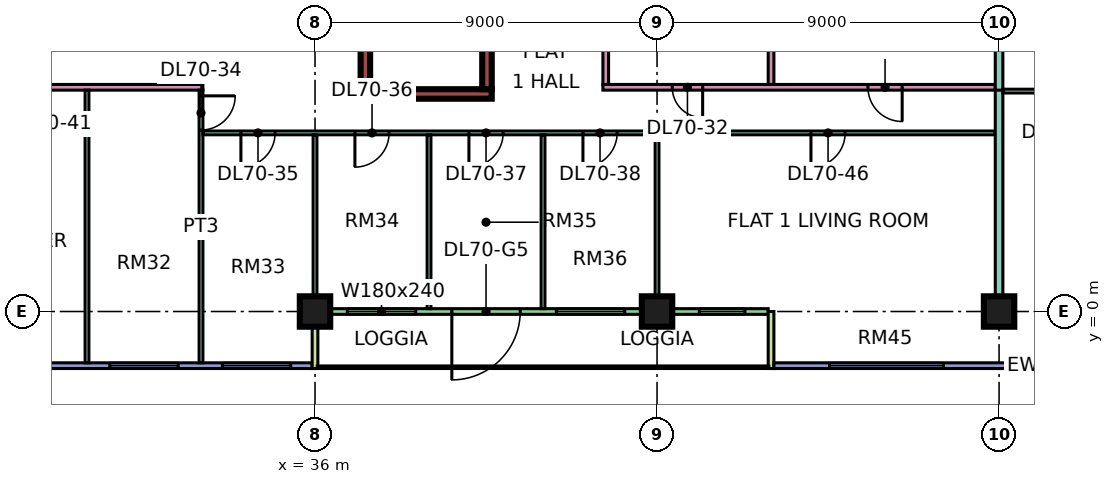
"""IFC4 building model, lengths in metres.
Left out: names, types, materials, properties, quantities, classifications, styles, units other than length and angle.
Written with IfcOpenShell. Run it as: python <this file> out.ifc"""

import sys

from ifc_helpers import new_model, si_unit, direction, frame, frame_2d, origin, origin_2d, place, context, subcontext, project, spatial, rectangle, extrude, element, fill, save


model = new_model("IFC4")
c1 = context("Model", 3, precision=1e-05, world=origin(), true_north=direction((0.0, 1.0)))
c2 = subcontext(c1, "Body", "Model", "MODEL_VIEW")
j1 = project(units=[si_unit("LENGTHUNIT", "METRE"), si_unit("PLANEANGLEUNIT", "RADIAN")], contexts=[c1])
p1 = place(None, origin())
s1 = spatial("IfcSite", under=j1, at=p1, CompositionType="ELEMENT")
p2 = place(p1, origin())
s2 = spatial("IfcBuilding", under=s1, at=p2, CompositionType="ELEMENT")
p3 = place(p2, frame((0.0, 0.0, 299.65)))
s3 = spatial("IfcBuildingStorey", under=s2, at=p3, CompositionType="ELEMENT", Elevation=299.65)
for number, where, z_axis, x_axis in (
    (1, (36.0, 0.0, 0.0), (0.0, 0.0, 1.0), (1.0, 0.0, 0.0)),
    (2, (45.0, 0.0, 0.0), (0.0, 0.0, 1.0), (1.0, 0.0, 0.0)),
    (3, (54.0, 0.0, 0.0), (0.0, 0.0, 1.0), (1.0, 0.0, 0.0)),
):
    element("IfcColumn", number, at=place(p3, frame(where, z_axis=z_axis, x_axis=x_axis)), inside=s3, PredefinedType="COLUMN", context=c2, shape_type="SweptSolid", body=[
        extrude(rectangle(XDim=0.8, YDim=0.8, at=origin_2d()), origin(), (0.0, 0.0, 1.0), 3.75),
    ])
p4 = place(p3, frame((37.2, 5.725, 0.0), z_axis=(0.0, 0.0, 1.0), x_axis=(1.0, 0.0, 0.0)))
e4 = element("IfcWall", 4, at=p4, inside=s3, PredefinedType="SHEAR", context=c2, shape_type="SweptSolid", body=[
    extrude(rectangle(XDim=3.45, YDim=0.25, at=frame_2d((1.725, 0.0))), origin(), (0.0, 0.0, 1.0), 3.75),
])
for number, where, z_axis, x_axis in (
    (5, (37.325, 5.85, 0.0), (0.0, 0.0, 1.0), (0.0, 1.0, 0.0)),
    (6, (40.525, 5.85, 0.0), (0.0, 0.0, 1.0), (0.0, 1.0, 0.0)),
):
    element("IfcWall", number, at=place(p3, frame(where, z_axis=z_axis, x_axis=x_axis)), inside=s3, PredefinedType="SHEAR", context=c2, shape_type="SweptSolid", body=[
        extrude(rectangle(XDim=6.5, YDim=0.25, at=frame_2d((3.25, 0.0))), origin(), (0.0, 0.0, 1.0), 3.75),
    ])
p5 = place(p3, frame((24.075, -1.425, 0.0), z_axis=(0.0, 0.0, 1.0), x_axis=(1.0, 0.0, 0.0)))
e7 = element("IfcWall", 7, at=p5, inside=s3, PredefinedType="SOLIDWALL", context=c2, shape_type="SweptSolid", body=[
    extrude(rectangle(XDim=11.85, YDim=0.15, at=frame_2d((5.925, 0.0))), origin(), (0.0, 0.0, 1.0), 3.35),
])
p6 = place(p5, frame((1.462, 0.0, 0.45)))
e8 = element("IfcOpeningElement", 8, at=p6, cuts=e7, PredefinedType="OPENING", context=c2, shape_type="SweptSolid", body=[
    extrude(rectangle(XDim=3.0, YDim=2.4, at=frame_2d((1.5, 1.2))), frame((0.0, 0.085, 0.0), z_axis=(0.0, -1.0, 0.0), x_axis=(1.0, 0.0, 0.0)), (0.0, 0.0, 1.0), 0.17),
])
p7 = place(p5, frame((6.525, 0.0, 0.45)))
e9 = element("IfcOpeningElement", 9, at=p7, cuts=e7, PredefinedType="OPENING", context=c2, shape_type="SweptSolid", body=[
    extrude(rectangle(XDim=1.8, YDim=2.4, at=frame_2d((0.9, 1.2))), frame((0.0, 0.085, 0.0), z_axis=(0.0, -1.0, 0.0), x_axis=(1.0, 0.0, 0.0)), (0.0, 0.0, 1.0), 0.17),
])
p8 = place(p5, frame((9.488, 0.0, 0.45)))
e10 = element("IfcOpeningElement", 10, at=p8, cuts=e7, PredefinedType="OPENING", context=c2, shape_type="SweptSolid", body=[
    extrude(rectangle(XDim=1.8, YDim=2.4, at=frame_2d((0.9, 1.2))), frame((0.0, 0.085, 0.0), z_axis=(0.0, -1.0, 0.0), x_axis=(1.0, 0.0, 0.0)), (0.0, 0.0, 1.0), 0.17),
])
p9 = place(p3, frame((36.075, 0.0, 0.0), z_axis=(0.0, 0.0, 1.0), x_axis=(1.0, 0.0, 0.0)))
e11 = element("IfcWall", 11, at=p9, inside=s3, PredefinedType="SOLIDWALL", context=c2, shape_type="SweptSolid", body=[
    extrude(rectangle(XDim=11.85, YDim=0.15, at=frame_2d((5.925, 0.0))), origin(), (0.0, 0.0, 1.0), 3.35),
])
p10 = place(p9, frame((0.775, 0.0, 0.45)))
e12 = element("IfcOpeningElement", 12, at=p10, cuts=e11, PredefinedType="OPENING", context=c2, shape_type="SweptSolid", body=[
    extrude(rectangle(XDim=1.8, YDim=2.4, at=frame_2d((0.9, 1.2))), frame((0.0, 0.085, 0.0), z_axis=(0.0, -1.0, 0.0), x_axis=(1.0, 0.0, 0.0)), (0.0, 0.0, 1.0), 0.17),
])
p11 = place(p9, frame((3.525, 0.0, 0.0)))
e13 = element("IfcOpeningElement", 13, at=p11, cuts=e11, PredefinedType="OPENING", context=c2, shape_type="SweptSolid", body=[
    extrude(rectangle(XDim=1.8, YDim=2.4, at=frame_2d((0.9, 1.2))), frame((0.0, 0.085, 0.0), z_axis=(0.0, -1.0, 0.0), x_axis=(1.0, 0.0, 0.0)), (0.0, 0.0, 1.0), 0.17),
])
p12 = place(p9, frame((6.275, 0.0, 0.45)))
e14 = element("IfcOpeningElement", 14, at=p12, cuts=e11, PredefinedType="OPENING", context=c2, shape_type="SweptSolid", body=[
    extrude(rectangle(XDim=1.8, YDim=2.4, at=frame_2d((0.9, 1.2))), frame((0.0, 0.085, 0.0), z_axis=(0.0, -1.0, 0.0), x_axis=(1.0, 0.0, 0.0)), (0.0, 0.0, 1.0), 0.17),
])
p13 = place(p9, frame((10.038, 0.0, 0.45)))
e15 = element("IfcOpeningElement", 15, at=p13, cuts=e11, PredefinedType="OPENING", context=c2, shape_type="SweptSolid", body=[
    extrude(rectangle(XDim=1.2, YDim=2.4, at=frame_2d((0.6, 1.2))), frame((0.0, 0.085, 0.0), z_axis=(0.0, -1.0, 0.0), x_axis=(1.0, 0.0, 0.0)), (0.0, 0.0, 1.0), 0.17),
])
for number, where, z_axis, x_axis in (
    (16, (36.0, -1.5, 0.0), (0.0, 0.0, 1.0), (0.0, 1.0, 0.0)),
    (17, (48.0, -1.5, 0.0), (0.0, 0.0, 1.0), (0.0, 1.0, 0.0)),
):
    element("IfcWall", number, at=place(p3, frame(where, z_axis=z_axis, x_axis=x_axis)), inside=s3, PredefinedType="SOLIDWALL", context=c2, shape_type="SweptSolid", body=[
        extrude(rectangle(XDim=1.5, YDim=0.15, at=frame_2d((0.75, 0.0))), origin(), (0.0, 0.0, 1.0), 3.35),
    ])
p14 = place(p3, frame((48.075, -1.425, 0.0), z_axis=(0.0, 0.0, 1.0), x_axis=(1.0, 0.0, 0.0)))
e18 = element("IfcWall", 18, at=p14, inside=s3, PredefinedType="SOLIDWALL", context=c2, shape_type="SweptSolid", body=[
    extrude(rectangle(XDim=13.425, YDim=0.15, at=frame_2d((6.712, 0.0))), origin(), (0.0, 0.0, 1.0), 3.35),
])
p15 = place(p14, frame((1.462, 0.0, 0.45)))
e19 = element("IfcOpeningElement", 19, at=p15, cuts=e18, PredefinedType="OPENING", context=c2, shape_type="SweptSolid", body=[
    extrude(rectangle(XDim=3.0, YDim=2.4, at=frame_2d((1.5, 1.2))), frame((0.0, 0.085, 0.0), z_axis=(0.0, -1.0, 0.0), x_axis=(1.0, 0.0, 0.0)), (0.0, 0.0, 1.0), 0.17),
])
p16 = place(p14, frame((6.525, 0.0, 0.45)))
e20 = element("IfcOpeningElement", 20, at=p16, cuts=e18, PredefinedType="OPENING", context=c2, shape_type="SweptSolid", body=[
    extrude(rectangle(XDim=1.8, YDim=2.4, at=frame_2d((0.9, 1.2))), frame((0.0, 0.085, 0.0), z_axis=(0.0, -1.0, 0.0), x_axis=(1.0, 0.0, 0.0)), (0.0, 0.0, 1.0), 0.17),
])
p17 = place(p14, frame((9.675, 0.0, 0.45)))
e21 = element("IfcOpeningElement", 21, at=p17, cuts=e18, PredefinedType="OPENING", context=c2, shape_type="SweptSolid", body=[
    extrude(rectangle(XDim=3.0, YDim=2.4, at=frame_2d((1.5, 1.2))), frame((0.0, 0.085, 0.0), z_axis=(0.0, -1.0, 0.0), x_axis=(1.0, 0.0, 0.0)), (0.0, 0.0, 1.0), 0.17),
])
p18 = place(p3, frame((11.95, 5.9, 0.0), z_axis=(0.0, 0.0, 1.0), x_axis=(1.0, 0.0, 0.0)))
e22 = element("IfcWall", 22, at=p18, inside=s3, PredefinedType="PARTITIONING", context=c2, shape_type="SweptSolid", body=[
    extrude(rectangle(XDim=21.1, YDim=0.15, at=frame_2d((10.55, 0.0))), origin(), (0.0, 0.0, 1.0), 3.35),
])
p19 = place(p18, frame((1.1, 0.0, 0.0)))
e23 = element("IfcOpeningElement", 23, at=p19, cuts=e22, PredefinedType="OPENING", context=c2, shape_type="SweptSolid", body=[
    extrude(rectangle(XDim=0.9, YDim=2.1, at=frame_2d((0.45, 1.05))), frame((0.0, 0.085, 0.0), z_axis=(0.0, -1.0, 0.0), x_axis=(1.0, 0.0, 0.0)), (0.0, 0.0, 1.0), 0.17),
])
p20 = place(p18, frame((16.1, 0.0, 0.0)))
e24 = element("IfcOpeningElement", 24, at=p20, cuts=e22, PredefinedType="OPENING", context=c2, shape_type="SweptSolid", body=[
    extrude(rectangle(XDim=0.9, YDim=2.1, at=frame_2d((0.45, 1.05))), frame((0.0, 0.085, 0.0), z_axis=(0.0, -1.0, 0.0), x_axis=(1.0, 0.0, 0.0)), (0.0, 0.0, 1.0), 0.17),
])
p21 = place(p18, frame((7.1, 0.0, 0.0)))
e25 = element("IfcOpeningElement", 25, at=p21, cuts=e22, PredefinedType="OPENING", context=c2, shape_type="SweptSolid", body=[
    extrude(rectangle(XDim=0.9, YDim=2.1, at=frame_2d((0.45, 1.05))), frame((0.0, 0.085, 0.0), z_axis=(0.0, -1.0, 0.0), x_axis=(1.0, 0.0, 0.0)), (0.0, 0.0, 1.0), 0.17),
])
p22 = place(p3, frame((30.0, -1.351, 0.0), z_axis=(0.0, 0.0, 1.0), x_axis=(0.0, 1.0, 0.0)))
e26 = element("IfcWall", 26, at=p22, inside=s3, PredefinedType="PARTITIONING", context=c2, shape_type="SweptSolid", body=[
    extrude(rectangle(XDim=7.176, YDim=0.1, at=frame_2d((3.588, 0.0))), origin(), (0.0, 0.0, 1.0), 3.35),
])
p23 = place(p3, frame((33.0, -1.351, 0.0), z_axis=(0.0, 0.0, 1.0), x_axis=(0.0, 1.0, 0.0)))
e27 = element("IfcWall", 27, at=p23, inside=s3, PredefinedType="PARTITIONING", context=c2, shape_type="SweptSolid", body=[
    extrude(rectangle(XDim=7.176, YDim=0.1, at=frame_2d((3.588, 0.0))), origin(), (0.0, 0.0, 1.0), 3.35),
])
p24 = place(p23, frame((6.126, 0.0, 0.0)))
e28 = element("IfcOpeningElement", 28, at=p24, cuts=e27, PredefinedType="OPENING", context=c2, shape_type="SweptSolid", body=[
    extrude(rectangle(XDim=0.9, YDim=2.1, at=frame_2d((0.45, 1.05))), frame((0.0, 0.06, 0.0), z_axis=(0.0, -1.0, 0.0), x_axis=(1.0, 0.0, 0.0)), (0.0, 0.0, 1.0), 0.12),
])
p25 = place(p3, frame((33.05, 4.7, 0.0), z_axis=(0.0, 0.0, 1.0), x_axis=(1.0, 0.0, 0.0)))
e29 = element("IfcWall", 29, at=p25, inside=s3, PredefinedType="PARTITIONING", context=c2, shape_type="SweptSolid", body=[
    extrude(rectangle(XDim=20.85, YDim=0.1, at=frame_2d((10.425, 0.0))), origin(), (0.0, 0.0, 1.0), 3.35),
])
p26 = place(p25, frame((1.0, 0.0, 0.0)))
e30 = element("IfcOpeningElement", 30, at=p26, cuts=e29, PredefinedType="OPENING", context=c2, shape_type="SweptSolid", body=[
    extrude(rectangle(XDim=0.9, YDim=2.1, at=frame_2d((0.45, 1.05))), frame((0.0, 0.06, 0.0), z_axis=(0.0, -1.0, 0.0), x_axis=(1.0, 0.0, 0.0)), (0.0, 0.0, 1.0), 0.12),
])
p27 = place(p25, frame((4.0, 0.0, 0.0)))
e31 = element("IfcOpeningElement", 31, at=p27, cuts=e29, PredefinedType="OPENING", context=c2, shape_type="SweptSolid", body=[
    extrude(rectangle(XDim=0.9, YDim=2.1, at=frame_2d((0.45, 1.05))), frame((0.0, 0.06, 0.0), z_axis=(0.0, -1.0, 0.0), x_axis=(1.0, 0.0, 0.0)), (0.0, 0.0, 1.0), 0.12),
])
p28 = place(p25, frame((7.0, 0.0, 0.0)))
e32 = element("IfcOpeningElement", 32, at=p28, cuts=e29, PredefinedType="OPENING", context=c2, shape_type="SweptSolid", body=[
    extrude(rectangle(XDim=0.9, YDim=2.1, at=frame_2d((0.45, 1.05))), frame((0.0, 0.06, 0.0), z_axis=(0.0, -1.0, 0.0), x_axis=(1.0, 0.0, 0.0)), (0.0, 0.0, 1.0), 0.12),
])
p29 = place(p25, frame((10.0, 0.0, 0.0)))
e33 = element("IfcOpeningElement", 33, at=p29, cuts=e29, PredefinedType="OPENING", context=c2, shape_type="SweptSolid", body=[
    extrude(rectangle(XDim=0.9, YDim=2.1, at=frame_2d((0.45, 1.05))), frame((0.0, 0.06, 0.0), z_axis=(0.0, -1.0, 0.0), x_axis=(1.0, 0.0, 0.0)), (0.0, 0.0, 1.0), 0.12),
])
p30 = place(p25, frame((16.0, 0.0, 0.0)))
e34 = element("IfcOpeningElement", 34, at=p30, cuts=e29, PredefinedType="OPENING", context=c2, shape_type="SweptSolid", body=[
    extrude(rectangle(XDim=0.9, YDim=2.1, at=frame_2d((0.45, 1.05))), frame((0.0, 0.06, 0.0), z_axis=(0.0, -1.0, 0.0), x_axis=(1.0, 0.0, 0.0)), (0.0, 0.0, 1.0), 0.12),
])
p31 = place(p3, frame((36.0, 0.0, 0.0), z_axis=(0.0, 0.0, 1.0), x_axis=(0.0, 1.0, 0.0)))
e35 = element("IfcWall", 35, at=p31, inside=s3, PredefinedType="PARTITIONING", context=c2, shape_type="SweptSolid", body=[
    extrude(rectangle(XDim=4.65, YDim=0.1, at=frame_2d((2.325, 0.0))), origin(), (0.0, 0.0, 1.0), 3.35),
])
for number, where, z_axis, x_axis in (
    (36, (39.0, 0.074, 0.0), (0.0, 0.0, 1.0), (0.0, 1.0, 0.0)),
    (37, (42.0, 0.074, 0.0), (0.0, 0.0, 1.0), (0.0, 1.0, 0.0)),
):
    element("IfcWall", number, at=place(p3, frame(where, z_axis=z_axis, x_axis=x_axis)), inside=s3, PredefinedType="PARTITIONING", context=c2, shape_type="SweptSolid", body=[
        extrude(rectangle(XDim=4.576, YDim=0.1, at=frame_2d((2.288, 0.0))), origin(), (0.0, 0.0, 1.0), 3.35),
    ])
p32 = place(p3, frame((43.575, 5.9, 0.0), z_axis=(0.0, 0.0, 1.0), x_axis=(1.0, 0.0, 0.0)))
e38 = element("IfcWall", 38, at=p32, inside=s3, PredefinedType="PARTITIONING", context=c2, shape_type="SweptSolid", body=[
    extrude(rectangle(XDim=10.325, YDim=0.15, at=frame_2d((5.163, 0.0))), origin(), (0.0, 0.0, 1.0), 3.35),
])
p33 = place(p32, frame((1.825, 0.0, 0.0)))
e39 = element("IfcOpeningElement", 39, at=p33, cuts=e38, PredefinedType="OPENING", context=c2, shape_type="SweptSolid", body=[
    extrude(rectangle(XDim=0.8, YDim=2.1, at=frame_2d((0.4, 1.05))), frame((0.0, 0.085, 0.0), z_axis=(0.0, -1.0, 0.0), x_axis=(1.0, 0.0, 0.0)), (0.0, 0.0, 1.0), 0.17),
])
p34 = place(p32, frame((6.975, 0.0, 0.0)))
e40 = element("IfcOpeningElement", 40, at=p34, cuts=e38, PredefinedType="OPENING", context=c2, shape_type="SweptSolid", body=[
    extrude(rectangle(XDim=0.9, YDim=2.1, at=frame_2d((0.45, 1.05))), frame((0.0, 0.085, 0.0), z_axis=(0.0, -1.0, 0.0), x_axis=(1.0, 0.0, 0.0)), (0.0, 0.0, 1.0), 0.17),
])
p35 = place(p3, frame((43.65, 5.975, 0.0), z_axis=(0.0, 0.0, 1.0), x_axis=(0.0, 1.0, 0.0)))
e41 = element("IfcWall", 41, at=p35, inside=s3, PredefinedType="PARTITIONING", context=c2, shape_type="SweptSolid", body=[
    extrude(rectangle(XDim=6.325, YDim=0.15, at=frame_2d((3.163, 0.0))), origin(), (0.0, 0.0, 1.0), 3.35),
])
p36 = place(p35, frame((4.275, 0.0, 0.0)))
e42 = element("IfcOpeningElement", 42, at=p36, cuts=e41, PredefinedType="OPENING", context=c2, shape_type="SweptSolid", body=[
    extrude(rectangle(XDim=0.9, YDim=2.1, at=frame_2d((0.45, 1.05))), frame((0.0, 0.085, 0.0), z_axis=(0.0, -1.0, 0.0), x_axis=(1.0, 0.0, 0.0)), (0.0, 0.0, 1.0), 0.17),
])
p37 = place(p3, frame((45.0, 0.074, 0.0), z_axis=(0.0, 0.0, 1.0), x_axis=(0.0, 1.0, 0.0)))
e43 = element("IfcWall", 43, at=p37, inside=s3, PredefinedType="PARTITIONING", context=c2, shape_type="SweptSolid", body=[
    extrude(rectangle(XDim=4.576, YDim=0.1, at=frame_2d((2.288, 0.0))), origin(), (0.0, 0.0, 1.0), 3.35),
])
p38 = place(p3, frame((48.0, 5.975, 0.0), z_axis=(0.0, 0.0, 1.0), x_axis=(0.0, 1.0, 0.0)))
e44 = element("IfcWall", 44, at=p38, inside=s3, PredefinedType="PARTITIONING", context=c2, shape_type="SweptSolid", body=[
    extrude(rectangle(XDim=6.325, YDim=0.15, at=frame_2d((3.163, 0.0))), origin(), (0.0, 0.0, 1.0), 3.35),
])
p39 = place(p3, frame((54.0, 0.0, 0.0), z_axis=(0.0, 0.0, 1.0), x_axis=(0.0, 1.0, 0.0)))
e45 = element("IfcWall", 45, at=p39, inside=s3, PredefinedType="PARTITIONING", context=c2, shape_type="SweptSolid", body=[
    extrude(rectangle(XDim=5.85, YDim=0.2, at=frame_2d((2.925, 0.0))), origin(), (0.0, 0.0, 1.0), 3.35),
])
p40 = place(p3, frame((54.0, 5.825, 0.0), z_axis=(0.0, 0.0, 1.0), x_axis=(0.0, 1.0, 0.0)))
e46 = element("IfcWall", 46, at=p40, inside=s3, PredefinedType="PARTITIONING", context=c2, shape_type="SweptSolid", body=[
    extrude(rectangle(XDim=6.475, YDim=0.2, at=frame_2d((3.238, 0.0))), origin(), (0.0, 0.0, 1.0), 3.35),
])
p41 = place(p3, frame((54.1, 5.8, 0.0), z_axis=(0.0, 0.0, 1.0), x_axis=(1.0, 0.0, 0.0)))
e47 = element("IfcWall", 47, at=p41, inside=s3, PredefinedType="PARTITIONING", context=c2, shape_type="SweptSolid", body=[
    extrude(rectangle(XDim=2.85, YDim=0.1, at=frame_2d((1.425, 0.0))), origin(), (0.0, 0.0, 1.0), 3.35),
])
p42 = place(p41, frame((0.95, 0.0, 0.0)))
e48 = element("IfcOpeningElement", 48, at=p42, cuts=e47, PredefinedType="OPENING", context=c2, shape_type="SweptSolid", body=[
    extrude(rectangle(XDim=0.9, YDim=2.1, at=frame_2d((0.45, 1.05))), frame((0.0, 0.06, 0.0), z_axis=(0.0, -1.0, 0.0), x_axis=(1.0, 0.0, 0.0)), (0.0, 0.0, 1.0), 0.12),
])
p43 = place(p7, origin())
e49 = element("IfcWindow", 49, at=p43, inside=s3, PartitioningType="SINGLE_PANEL", PredefinedType="WINDOW", context=c2, shape_type="SweptSolid", body=[
    extrude(rectangle(XDim=1.8, YDim=2.4, at=frame_2d((0.9, 1.2))), frame((0.0, 0.03, 0.0), z_axis=(0.0, -1.0, 0.0), x_axis=(1.0, 0.0, 0.0)), (0.0, 0.0, 1.0), 0.06),
])
fill(e9, e49)
p44 = place(p8, origin())
e50 = element("IfcWindow", 50, at=p44, inside=s3, PartitioningType="SINGLE_PANEL", PredefinedType="WINDOW", context=c2, shape_type="SweptSolid", body=[
    extrude(rectangle(XDim=1.8, YDim=2.4, at=frame_2d((0.9, 1.2))), frame((0.0, 0.03, 0.0), z_axis=(0.0, -1.0, 0.0), x_axis=(1.0, 0.0, 0.0)), (0.0, 0.0, 1.0), 0.06),
])
fill(e10, e50)
p45 = place(p10, origin())
e51 = element("IfcWindow", 51, at=p45, inside=s3, PartitioningType="SINGLE_PANEL", PredefinedType="WINDOW", context=c2, shape_type="SweptSolid", body=[
    extrude(rectangle(XDim=1.8, YDim=2.4, at=frame_2d((0.9, 1.2))), frame((0.0, 0.03, 0.0), z_axis=(0.0, -1.0, 0.0), x_axis=(1.0, 0.0, 0.0)), (0.0, 0.0, 1.0), 0.06),
])
fill(e12, e51)
p46 = place(p11, frame((1.8, 0.0, 0.0), z_axis=(0.0, 0.0, 1.0), x_axis=(-1.0, 0.0, 0.0)))
e52 = element("IfcDoor", 52, at=p46, inside=s3, OperationType="DOUBLE_DOOR_SINGLE_SWING", PredefinedType="DOOR", context=c2, shape_type="SweptSolid", body=[
    extrude(rectangle(XDim=1.8, YDim=2.4, at=frame_2d((0.9, 1.2))), frame((0.0, 0.025, 0.0), z_axis=(0.0, -1.0, 0.0), x_axis=(1.0, 0.0, 0.0)), (0.0, 0.0, 1.0), 0.05),
])
fill(e13, e52)
p47 = place(p12, origin())
e53 = element("IfcWindow", 53, at=p47, inside=s3, PartitioningType="SINGLE_PANEL", PredefinedType="WINDOW", context=c2, shape_type="SweptSolid", body=[
    extrude(rectangle(XDim=1.8, YDim=2.4, at=frame_2d((0.9, 1.2))), frame((0.0, 0.03, 0.0), z_axis=(0.0, -1.0, 0.0), x_axis=(1.0, 0.0, 0.0)), (0.0, 0.0, 1.0), 0.06),
])
fill(e14, e53)
p48 = place(p13, origin())
e54 = element("IfcWindow", 54, at=p48, inside=s3, PartitioningType="SINGLE_PANEL", PredefinedType="WINDOW", context=c2, shape_type="SweptSolid", body=[
    extrude(rectangle(XDim=1.2, YDim=2.4, at=frame_2d((0.6, 1.2))), frame((0.0, 0.03, 0.0), z_axis=(0.0, -1.0, 0.0), x_axis=(1.0, 0.0, 0.0)), (0.0, 0.0, 1.0), 0.06),
])
fill(e15, e54)
p49 = place(p15, origin())
e55 = element("IfcWindow", 55, at=p49, inside=s3, PartitioningType="SINGLE_PANEL", PredefinedType="WINDOW", context=c2, shape_type="SweptSolid", body=[
    extrude(rectangle(XDim=3.0, YDim=2.4, at=frame_2d((1.5, 1.2))), frame((0.0, 0.03, 0.0), z_axis=(0.0, -1.0, 0.0), x_axis=(1.0, 0.0, 0.0)), (0.0, 0.0, 1.0), 0.06),
])
fill(e19, e55)
p50 = place(p16, origin())
e56 = element("IfcWindow", 56, at=p50, inside=s3, PartitioningType="SINGLE_PANEL", PredefinedType="WINDOW", context=c2, shape_type="SweptSolid", body=[
    extrude(rectangle(XDim=1.8, YDim=2.4, at=frame_2d((0.9, 1.2))), frame((0.0, 0.03, 0.0), z_axis=(0.0, -1.0, 0.0), x_axis=(1.0, 0.0, 0.0)), (0.0, 0.0, 1.0), 0.06),
])
fill(e20, e56)
p51 = place(p33, origin())
e57 = element("IfcDoor", 57, at=p51, inside=s3, OperationType="SINGLE_SWING_RIGHT", PredefinedType="DOOR", context=c2, shape_type="SweptSolid", body=[
    extrude(rectangle(XDim=0.8, YDim=2.1, at=frame_2d((0.4, 1.05))), frame((0.0, 0.025, 0.0), z_axis=(0.0, -1.0, 0.0), x_axis=(1.0, 0.0, 0.0)), (0.0, 0.0, 1.0), 0.05),
])
fill(e39, e57)
p52 = place(p24, origin())
e58 = element("IfcDoor", 58, at=p52, inside=s3, OperationType="SINGLE_SWING_RIGHT", PredefinedType="DOOR", context=c2, shape_type="SweptSolid", body=[
    extrude(rectangle(XDim=0.9, YDim=2.1, at=frame_2d((0.45, 1.05))), frame((0.0, 0.025, 0.0), z_axis=(0.0, -1.0, 0.0), x_axis=(1.0, 0.0, 0.0)), (0.0, 0.0, 1.0), 0.05),
])
fill(e28, e58)
p53 = place(p26, frame((0.9, 0.0, 0.0), z_axis=(0.0, 0.0, 1.0), x_axis=(-1.0, 0.0, 0.0)))
e59 = element("IfcDoor", 59, at=p53, inside=s3, OperationType="SINGLE_SWING_LEFT", PredefinedType="DOOR", context=c2, shape_type="SweptSolid", body=[
    extrude(rectangle(XDim=0.9, YDim=2.1, at=frame_2d((0.45, 1.05))), frame((0.0, 0.025, 0.0), z_axis=(0.0, -1.0, 0.0), x_axis=(1.0, 0.0, 0.0)), (0.0, 0.0, 1.0), 0.05),
])
fill(e30, e59)
p54 = place(p27, frame((0.9, 0.0, 0.0), z_axis=(0.0, 0.0, 1.0), x_axis=(-1.0, 0.0, 0.0)))
e60 = element("IfcDoor", 60, at=p54, inside=s3, OperationType="SINGLE_SWING_LEFT", PredefinedType="DOOR", context=c2, shape_type="SweptSolid", body=[
    extrude(rectangle(XDim=0.9, YDim=2.1, at=frame_2d((0.45, 1.05))), frame((0.0, 0.025, 0.0), z_axis=(0.0, -1.0, 0.0), x_axis=(1.0, 0.0, 0.0)), (0.0, 0.0, 1.0), 0.05),
])
fill(e31, e60)
p55 = place(p28, frame((0.9, 0.0, 0.0), z_axis=(0.0, 0.0, 1.0), x_axis=(-1.0, 0.0, 0.0)))
e61 = element("IfcDoor", 61, at=p55, inside=s3, OperationType="SINGLE_SWING_LEFT", PredefinedType="DOOR", context=c2, shape_type="SweptSolid", body=[
    extrude(rectangle(XDim=0.9, YDim=2.1, at=frame_2d((0.45, 1.05))), frame((0.0, 0.025, 0.0), z_axis=(0.0, -1.0, 0.0), x_axis=(1.0, 0.0, 0.0)), (0.0, 0.0, 1.0), 0.05),
])
fill(e32, e61)
p56 = place(p29, frame((0.9, 0.0, 0.0), z_axis=(0.0, 0.0, 1.0), x_axis=(-1.0, 0.0, 0.0)))
e62 = element("IfcDoor", 62, at=p56, inside=s3, OperationType="SINGLE_SWING_LEFT", PredefinedType="DOOR", context=c2, shape_type="SweptSolid", body=[
    extrude(rectangle(XDim=0.9, YDim=2.1, at=frame_2d((0.45, 1.05))), frame((0.0, 0.025, 0.0), z_axis=(0.0, -1.0, 0.0), x_axis=(1.0, 0.0, 0.0)), (0.0, 0.0, 1.0), 0.05),
])
fill(e33, e62)
p57 = place(p30, frame((0.9, 0.0, 0.0), z_axis=(0.0, 0.0, 1.0), x_axis=(-1.0, 0.0, 0.0)))
e63 = element("IfcDoor", 63, at=p57, inside=s3, OperationType="SINGLE_SWING_LEFT", PredefinedType="DOOR", context=c2, shape_type="SweptSolid", body=[
    extrude(rectangle(XDim=0.9, YDim=2.1, at=frame_2d((0.45, 1.05))), frame((0.0, 0.025, 0.0), z_axis=(0.0, -1.0, 0.0), x_axis=(1.0, 0.0, 0.0)), (0.0, 0.0, 1.0), 0.05),
])
fill(e34, e63)
p58 = place(p34, origin())
e64 = element("IfcDoor", 64, at=p58, inside=s3, OperationType="SINGLE_SWING_RIGHT", PredefinedType="DOOR", context=c2, shape_type="SweptSolid", body=[
    extrude(rectangle(XDim=0.9, YDim=2.1, at=frame_2d((0.45, 1.05))), frame((0.0, 0.025, 0.0), z_axis=(0.0, -1.0, 0.0), x_axis=(1.0, 0.0, 0.0)), (0.0, 0.0, 1.0), 0.05),
])
fill(e40, e64)
save(model, sys.argv[1])
